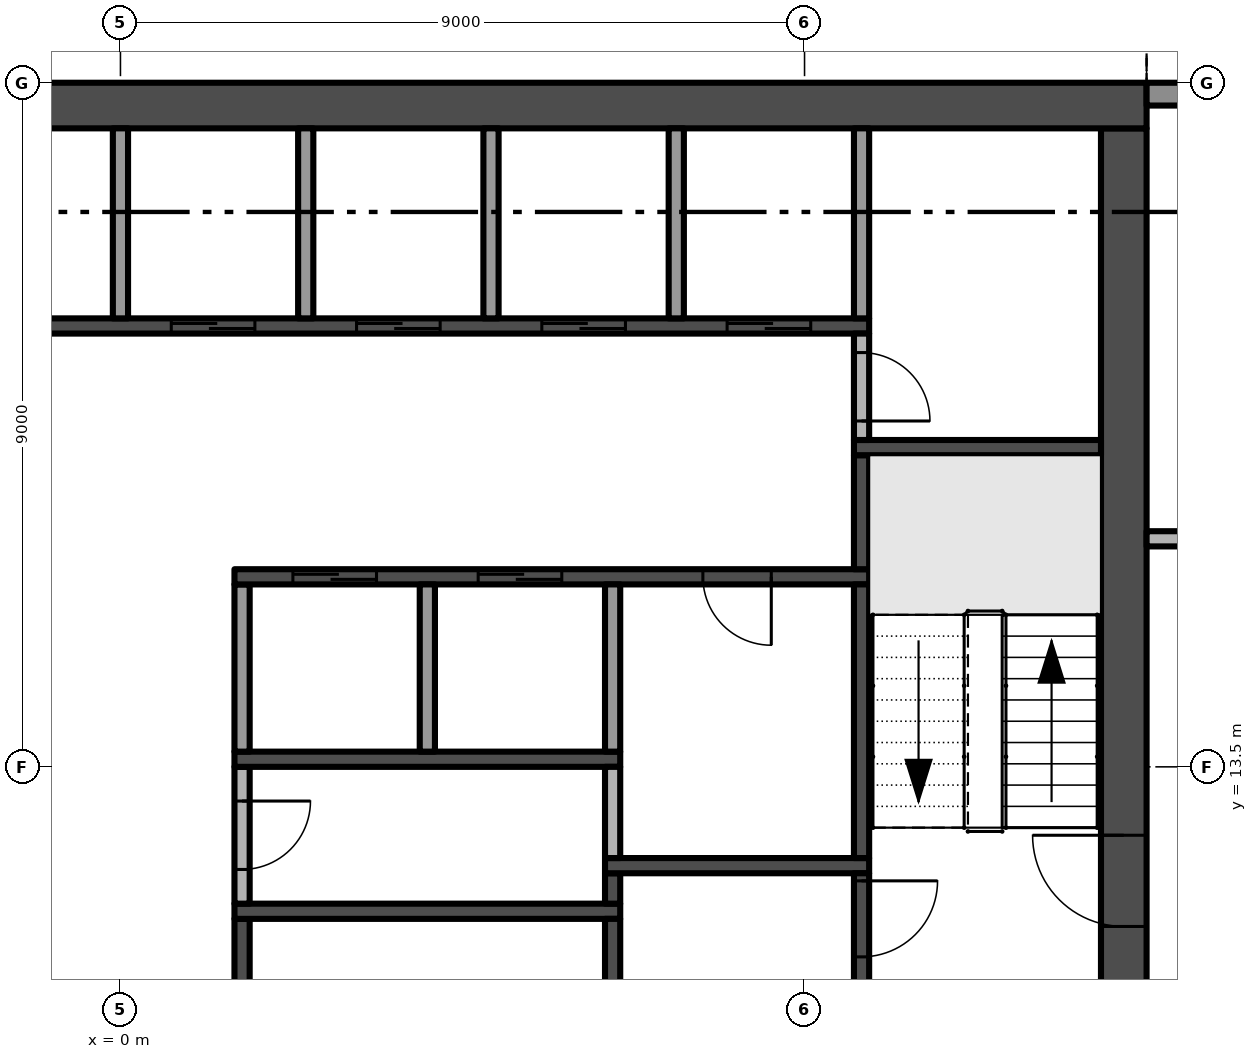
"""IFC4 building model, lengths in metres.
Left out: names, types, materials, properties, quantities, classifications, styles, units other than length and angle.
Written with IfcOpenShell. Run it as: python <this file> out.ifc"""

import sys

from ifc_helpers import new_model, si_unit, direction, frame, frame_2d, origin, place, context, subcontext, project, spatial, polyline, rectangle, outline, extrude, element, fill, save


model = new_model("IFC4")
c1 = context("Model", 3, precision=1e-05, world=origin(), true_north=direction((0.0, 1.0)))
c2 = subcontext(c1, "Body", "Model", "MODEL_VIEW")
j1 = project(units=[si_unit("LENGTHUNIT", "METRE"), si_unit("PLANEANGLEUNIT", "RADIAN")], contexts=[c1])
p1 = place(None, origin())
s1 = spatial("IfcSite", under=j1, at=p1, CompositionType="ELEMENT")
p2 = place(p1, origin())
s2 = spatial("IfcBuilding", under=s1, at=p2, CompositionType="ELEMENT")
p3 = place(p2, frame((0.0, 0.0, 199.6)))
s3 = spatial("IfcBuildingStorey", under=s2, at=p3, CompositionType="ELEMENT", Elevation=199.6)
p4 = place(p3, frame((13.2, 5.1, -0.3), z_axis=(0.0, 0.0, 1.0), x_axis=(0.0, 1.0, 0.0)))
e1 = element("IfcWall", 1, at=p4, inside=s3, PredefinedType="SHEAR", context=c2, shape_type="SweptSolid", body=[
    extrude(rectangle(XDim=16.8, YDim=0.6, at=frame_2d((8.4, 0.0))), origin(), (0.0, 0.0, 1.0), 3.8),
])
p5 = place(p4, frame((6.3, 0.0, 0.3)))
e2 = element("IfcOpeningElement", 2, at=p5, cuts=e1, PredefinedType="OPENING", context=c2, shape_type="SweptSolid", body=[
    extrude(rectangle(XDim=1.2, YDim=2.2, at=frame_2d((0.6, 1.1))), frame((0.0, 0.31, 0.0), z_axis=(0.0, -1.0, 0.0), x_axis=(1.0, 0.0, 0.0)), (0.0, 0.0, 1.0), 0.62),
])
p6 = place(p3, frame((13.5, 22.2, -0.3), z_axis=(0.0, 0.0, 1.0), x_axis=(-1.0, 0.0, 0.0)))
e3 = element("IfcWall", 3, at=p6, inside=s3, PredefinedType="SHEAR", context=c2, shape_type="SweptSolid", body=[
    extrude(rectangle(XDim=27.0, YDim=0.6, at=frame_2d((13.5, 0.0))), origin(), (0.0, 0.0, 1.0), 3.8),
])
p7 = place(p3, frame((13.5, 22.35, 0.0), z_axis=(0.0, 0.0, 1.0), x_axis=(1.0, 0.0, 0.0)))
e4 = element("IfcWall", 4, at=p7, inside=s3, PredefinedType="SOLIDWALL", context=c2, shape_type="SweptSolid", body=[
    extrude(rectangle(XDim=4.0, YDim=0.3, at=frame_2d((2.0, 0.0))), origin(), (0.0, 0.0, 1.0), 3.5),
])
p8 = place(p7, frame((0.625, 0.0, 0.0)))
e5 = element("IfcOpeningElement", 5, at=p8, cuts=e4, PredefinedType="OPENING", context=c2, shape_type="SweptSolid", body=[
    extrude(rectangle(XDim=3.075, YDim=2.4, at=frame_2d((1.538, 1.2))), frame((0.0, 0.16, 0.0), z_axis=(0.0, -1.0, 0.0), x_axis=(1.0, 0.0, 0.0)), (0.0, 0.0, 1.0), 0.32),
])
p9 = place(p3, origin())
e6 = element("IfcWall", 6, at=p9, inside=s3, PredefinedType="USERDEFINED", context=c2, shape_type="SweptSolid", body=[
    extrude(outline(polyline([(22.5, 23.451), (21.0, 23.115), (20.625, 23.1), (19.5, 23.231), (18.0, 23.755), (16.5, 24.488), (15.0, 25.149), (13.5, 25.485), (13.445, 25.241), (14.921, 24.91), (16.395, 24.261), (17.904, 23.524), (19.444, 22.986), (20.615, 22.849), (21.033, 22.866), (22.555, 23.208), (22.5, 23.451)])), origin(), (0.0, 0.0, 1.0), 0.9),
])
p10 = place(p3, frame((-9.85, 19.3, 0.0), z_axis=(0.0, 0.0, 1.0), x_axis=(1.0, 0.0, 0.0)))
e7 = element("IfcWall", 7, at=p10, inside=s3, PredefinedType="SHEAR", context=c2, shape_type="SweptSolid", body=[
    extrude(rectangle(XDim=19.7, YDim=0.2, at=frame_2d((9.85, 0.0))), origin(), (0.0, 0.0, 1.0), 3.5),
])
p11 = place(p10, frame((10.519, 0.0, 0.0)))
e8 = element("IfcOpeningElement", 8, at=p11, cuts=e7, PredefinedType="OPENING", context=c2, shape_type="SweptSolid", body=[
    extrude(rectangle(XDim=1.1, YDim=2.1, at=frame_2d((0.55, 1.05))), frame((0.0, 0.11, 0.0), z_axis=(0.0, -1.0, 0.0), x_axis=(1.0, 0.0, 0.0)), (0.0, 0.0, 1.0), 0.22),
])
p12 = place(p10, frame((12.956, 0.0, 0.0)))
e9 = element("IfcOpeningElement", 9, at=p12, cuts=e7, PredefinedType="OPENING", context=c2, shape_type="SweptSolid", body=[
    extrude(rectangle(XDim=1.1, YDim=2.1, at=frame_2d((0.55, 1.05))), frame((0.0, 0.11, 0.0), z_axis=(0.0, -1.0, 0.0), x_axis=(1.0, 0.0, 0.0)), (0.0, 0.0, 1.0), 0.22),
])
p13 = place(p10, frame((15.394, 0.0, 0.0)))
e10 = element("IfcOpeningElement", 10, at=p13, cuts=e7, PredefinedType="OPENING", context=c2, shape_type="SweptSolid", body=[
    extrude(rectangle(XDim=1.1, YDim=2.1, at=frame_2d((0.55, 1.05))), frame((0.0, 0.11, 0.0), z_axis=(0.0, -1.0, 0.0), x_axis=(1.0, 0.0, 0.0)), (0.0, 0.0, 1.0), 0.22),
])
p14 = place(p10, frame((17.831, 0.0, 0.0)))
e11 = element("IfcOpeningElement", 11, at=p14, cuts=e7, PredefinedType="OPENING", context=c2, shape_type="SweptSolid", body=[
    extrude(rectangle(XDim=1.1, YDim=2.1, at=frame_2d((0.55, 1.05))), frame((0.0, 0.11, 0.0), z_axis=(0.0, -1.0, 0.0), x_axis=(1.0, 0.0, 0.0)), (0.0, 0.0, 1.0), 0.22),
])
p15 = place(p10, frame((2.087, 0.0, 0.0)))
e12 = element("IfcOpeningElement", 12, at=p15, cuts=e7, PredefinedType="OPENING", context=c2, shape_type="SweptSolid", body=[
    extrude(rectangle(XDim=0.9, YDim=2.1, at=frame_2d((0.45, 1.05))), frame((0.0, 0.11, 0.0), z_axis=(0.0, -1.0, 0.0), x_axis=(1.0, 0.0, 0.0)), (0.0, 0.0, 1.0), 0.22),
])
p16 = place(p10, frame((6.963, 0.0, 0.0)))
e13 = element("IfcOpeningElement", 13, at=p16, cuts=e7, PredefinedType="OPENING", context=c2, shape_type="SweptSolid", body=[
    extrude(rectangle(XDim=0.9, YDim=2.1, at=frame_2d((0.45, 1.05))), frame((0.0, 0.11, 0.0), z_axis=(0.0, -1.0, 0.0), x_axis=(1.0, 0.0, 0.0)), (0.0, 0.0, 1.0), 0.22),
])
p17 = place(p3, frame((0.0, 19.4, 0.0), z_axis=(0.0, 0.0, 1.0), x_axis=(0.0, 1.0, 0.0)))
e14 = element("IfcWall", 14, at=p17, inside=s3, PredefinedType="PARTITIONING", context=c2, shape_type="SweptSolid", body=[
    extrude(rectangle(XDim=2.5, YDim=0.2, at=frame_2d((1.25, 0.0))), origin(), (0.0, 0.0, 1.0), 3.5),
])
p18 = place(p3, frame((1.6, 11.5, 0.0), z_axis=(0.0, 0.0, 1.0), x_axis=(0.0, -1.0, 0.0)))
e15 = element("IfcWall", 15, at=p18, inside=s3, PredefinedType="SHEAR", context=c2, shape_type="SweptSolid", body=[
    extrude(rectangle(XDim=6.4, YDim=0.2, at=frame_2d((3.2, 0.0))), origin(), (0.0, 0.0, 1.0), 3.5),
])
p19 = place(p18, frame((2.35, 0.0, 0.0)))
e16 = element("IfcOpeningElement", 16, at=p19, cuts=e15, PredefinedType="OPENING", context=c2, shape_type="SweptSolid", body=[
    extrude(rectangle(XDim=0.9, YDim=2.1, at=frame_2d((0.45, 1.05))), frame((0.0, 0.11, 0.0), z_axis=(0.0, -1.0, 0.0), x_axis=(1.0, 0.0, 0.0)), (0.0, 0.0, 1.0), 0.22),
])
p20 = place(p3, frame((1.5, 11.6, 0.0), z_axis=(0.0, 0.0, 1.0), x_axis=(1.0, 0.0, 0.0)))
e17 = element("IfcWall", 17, at=p20, inside=s3, PredefinedType="SHEAR", context=c2, shape_type="SweptSolid", body=[
    extrude(rectangle(XDim=5.075, YDim=0.2, at=frame_2d((2.538, 0.0))), origin(), (0.0, 0.0, 1.0), 3.5),
])
p21 = place(p3, frame((1.6, 13.5, 0.0), z_axis=(0.0, 0.0, 1.0), x_axis=(0.0, -1.0, 0.0)))
e18 = element("IfcWall", 18, at=p21, inside=s3, PredefinedType="PARTITIONING", context=c2, shape_type="SweptSolid", body=[
    extrude(rectangle(XDim=1.8, YDim=0.2, at=frame_2d((0.9, 0.0))), origin(), (0.0, 0.0, 1.0), 3.5),
])
p22 = place(p21, frame((0.45, 0.0, 0.0)))
e19 = element("IfcOpeningElement", 19, at=p22, cuts=e18, PredefinedType="OPENING", context=c2, shape_type="SweptSolid", body=[
    extrude(rectangle(XDim=0.9, YDim=2.1, at=frame_2d((0.45, 1.05))), frame((0.0, 0.11, 0.0), z_axis=(0.0, -1.0, 0.0), x_axis=(1.0, 0.0, 0.0)), (0.0, 0.0, 1.0), 0.22),
])
p23 = place(p3, frame((1.5, 13.6, 0.0), z_axis=(0.0, 0.0, 1.0), x_axis=(1.0, 0.0, 0.0)))
e20 = element("IfcWall", 20, at=p23, inside=s3, PredefinedType="SHEAR", context=c2, shape_type="SweptSolid", body=[
    extrude(rectangle(XDim=5.075, YDim=0.2, at=frame_2d((2.538, 0.0))), origin(), (0.0, 0.0, 1.0), 3.5),
])
p24 = place(p3, frame((1.6, 13.7, 0.0), z_axis=(0.0, 0.0, 1.0), x_axis=(0.0, 1.0, 0.0)))
e21 = element("IfcWall", 21, at=p24, inside=s3, PredefinedType="PARTITIONING", context=c2, shape_type="SweptSolid", body=[
    extrude(rectangle(XDim=2.2, YDim=0.2, at=frame_2d((1.1, 0.0))), origin(), (0.0, 0.0, 1.0), 3.5),
])
p25 = place(p3, frame((9.85, 16.0, 0.0), z_axis=(0.0, 0.0, 1.0), x_axis=(-1.0, 0.0, 0.0)))
e22 = element("IfcWall", 22, at=p25, inside=s3, PredefinedType="SHEAR", context=c2, shape_type="SweptSolid", body=[
    extrude(rectangle(XDim=8.35, YDim=0.2, at=frame_2d((4.175, 0.0))), origin(), (0.0, 0.0, 1.0), 3.5),
])
p26 = place(p25, frame((6.481, 0.0, 0.0)))
e23 = element("IfcOpeningElement", 23, at=p26, cuts=e22, PredefinedType="OPENING", context=c2, shape_type="SweptSolid", body=[
    extrude(rectangle(XDim=1.1, YDim=2.1, at=frame_2d((0.55, 1.05))), frame((0.0, 0.11, 0.0), z_axis=(0.0, -1.0, 0.0), x_axis=(1.0, 0.0, 0.0)), (0.0, 0.0, 1.0), 0.22),
])
p27 = place(p25, frame((4.044, 0.0, 0.0)))
e24 = element("IfcOpeningElement", 24, at=p27, cuts=e22, PredefinedType="OPENING", context=c2, shape_type="SweptSolid", body=[
    extrude(rectangle(XDim=1.1, YDim=2.1, at=frame_2d((0.55, 1.05))), frame((0.0, 0.11, 0.0), z_axis=(0.0, -1.0, 0.0), x_axis=(1.0, 0.0, 0.0)), (0.0, 0.0, 1.0), 0.22),
])
p28 = place(p25, frame((1.288, 0.0, 0.0)))
e25 = element("IfcOpeningElement", 25, at=p28, cuts=e22, PredefinedType="OPENING", context=c2, shape_type="SweptSolid", body=[
    extrude(rectangle(XDim=0.9, YDim=2.1, at=frame_2d((0.45, 1.05))), frame((0.0, 0.11, 0.0), z_axis=(0.0, -1.0, 0.0), x_axis=(1.0, 0.0, 0.0)), (0.0, 0.0, 1.0), 0.22),
])
p29 = place(p3, frame((2.438, 19.4, 0.0), z_axis=(0.0, 0.0, 1.0), x_axis=(0.0, 1.0, 0.0)))
e26 = element("IfcWall", 26, at=p29, inside=s3, PredefinedType="PARTITIONING", context=c2, shape_type="SweptSolid", body=[
    extrude(rectangle(XDim=2.5, YDim=0.2, at=frame_2d((1.25, 0.0))), origin(), (0.0, 0.0, 1.0), 3.5),
])
p30 = place(p3, frame((4.037, 13.7, 0.0), z_axis=(0.0, 0.0, 1.0), x_axis=(0.0, 1.0, 0.0)))
e27 = element("IfcWall", 27, at=p30, inside=s3, PredefinedType="PARTITIONING", context=c2, shape_type="SweptSolid", body=[
    extrude(rectangle(XDim=2.2, YDim=0.2, at=frame_2d((1.1, 0.0))), origin(), (0.0, 0.0, 1.0), 3.5),
])
p31 = place(p3, frame((4.875, 19.4, 0.0), z_axis=(0.0, 0.0, 1.0), x_axis=(0.0, 1.0, 0.0)))
e28 = element("IfcWall", 28, at=p31, inside=s3, PredefinedType="PARTITIONING", context=c2, shape_type="SweptSolid", body=[
    extrude(rectangle(XDim=2.5, YDim=0.2, at=frame_2d((1.25, 0.0))), origin(), (0.0, 0.0, 1.0), 3.5),
])
p32 = place(p3, frame((6.475, 5.1, 0.0), z_axis=(0.0, 0.0, 1.0), x_axis=(0.0, 1.0, 0.0)))
e29 = element("IfcWall", 29, at=p32, inside=s3, PredefinedType="SHEAR", context=c2, shape_type="SweptSolid", body=[
    extrude(rectangle(XDim=6.4, YDim=0.2, at=frame_2d((3.2, 0.0))), origin(), (0.0, 0.0, 1.0), 3.5),
])
p33 = place(p3, frame((6.475, 11.7, 0.0), z_axis=(0.0, 0.0, 1.0), x_axis=(0.0, 1.0, 0.0)))
e30 = element("IfcWall", 30, at=p33, inside=s3, PredefinedType="SHEAR", context=c2, shape_type="SweptSolid", body=[
    extrude(rectangle(XDim=0.4, YDim=0.2, at=frame_2d((0.2, 0.0))), origin(), (0.0, 0.0, 1.0), 3.5),
])
p34 = place(p3, frame((6.375, 12.2, 0.0), z_axis=(0.0, 0.0, 1.0), x_axis=(1.0, 0.0, 0.0)))
e31 = element("IfcWall", 31, at=p34, inside=s3, PredefinedType="SHEAR", context=c2, shape_type="SweptSolid", body=[
    extrude(rectangle(XDim=3.475, YDim=0.2, at=frame_2d((1.738, 0.0))), origin(), (0.0, 0.0, 1.0), 3.5),
])
p35 = place(p3, frame((6.475, 12.3, 0.0), z_axis=(0.0, 0.0, 1.0), x_axis=(0.0, 1.0, 0.0)))
e32 = element("IfcWall", 32, at=p35, inside=s3, PredefinedType="PARTITIONING", context=c2, shape_type="SweptSolid", body=[
    extrude(rectangle(XDim=1.2, YDim=0.2, at=frame_2d((0.6, 0.0))), origin(), (0.0, 0.0, 1.0), 3.5),
])
p36 = place(p3, frame((6.475, 13.7, 0.0), z_axis=(0.0, 0.0, 1.0), x_axis=(0.0, 1.0, 0.0)))
e33 = element("IfcWall", 33, at=p36, inside=s3, PredefinedType="PARTITIONING", context=c2, shape_type="SweptSolid", body=[
    extrude(rectangle(XDim=2.2, YDim=0.2, at=frame_2d((1.1, 0.0))), origin(), (0.0, 0.0, 1.0), 3.5),
])
p37 = place(p3, frame((7.312, 19.4, 0.0), z_axis=(0.0, 0.0, 1.0), x_axis=(0.0, 1.0, 0.0)))
e34 = element("IfcWall", 34, at=p37, inside=s3, PredefinedType="PARTITIONING", context=c2, shape_type="SweptSolid", body=[
    extrude(rectangle(XDim=2.5, YDim=0.2, at=frame_2d((1.25, 0.0))), origin(), (0.0, 0.0, 1.0), 3.5),
])
p38 = place(p3, frame((9.75, 12.1, 0.0), z_axis=(0.0, 0.0, 1.0), x_axis=(0.0, -1.0, 0.0)))
e35 = element("IfcWall", 35, at=p38, inside=s3, PredefinedType="SHEAR", context=c2, shape_type="SweptSolid", body=[
    extrude(rectangle(XDim=1.9, YDim=0.2, at=frame_2d((0.95, 0.0))), origin(), (0.0, 0.0, 1.0), 3.5),
])
p39 = place(p38, frame((0.1, 0.0, 0.0)))
e36 = element("IfcOpeningElement", 36, at=p39, cuts=e35, PredefinedType="OPENING", context=c2, shape_type="SweptSolid", body=[
    extrude(rectangle(XDim=1.0, YDim=2.2, at=frame_2d((0.5, 1.1))), frame((0.0, 0.11, 0.0), z_axis=(0.0, -1.0, 0.0), x_axis=(1.0, 0.0, 0.0)), (0.0, 0.0, 1.0), 0.22),
])
p40 = place(p3, frame((9.75, 12.3, 0.0), z_axis=(0.0, 0.0, 1.0), x_axis=(0.0, 1.0, 0.0)))
e37 = element("IfcWall", 37, at=p40, inside=s3, PredefinedType="SHEAR", context=c2, shape_type="SweptSolid", body=[
    extrude(rectangle(XDim=3.6, YDim=0.2, at=frame_2d((1.8, 0.0))), origin(), (0.0, 0.0, 1.0), 3.5),
])
p41 = place(p3, frame((9.75, 16.1, 0.0), z_axis=(0.0, 0.0, 1.0), x_axis=(0.0, 1.0, 0.0)))
e38 = element("IfcWall", 38, at=p41, inside=s3, PredefinedType="SHEAR", context=c2, shape_type="SweptSolid", body=[
    extrude(rectangle(XDim=1.5, YDim=0.2, at=frame_2d((0.75, 0.0))), origin(), (0.0, 0.0, 1.0), 3.5),
])
p42 = place(p3, frame((9.65, 17.7, 0.0), z_axis=(0.0, 0.0, 1.0), x_axis=(1.0, 0.0, 0.0)))
e39 = element("IfcWall", 39, at=p42, inside=s3, PredefinedType="SHEAR", context=c2, shape_type="SweptSolid", body=[
    extrude(rectangle(XDim=3.25, YDim=0.2, at=frame_2d((1.625, 0.0))), origin(), (0.0, 0.0, 1.0), 3.5),
])
p43 = place(p3, frame((9.75, 19.2, 0.0), z_axis=(0.0, 0.0, 1.0), x_axis=(0.0, -1.0, 0.0)))
e40 = element("IfcWall", 40, at=p43, inside=s3, PredefinedType="PARTITIONING", context=c2, shape_type="SweptSolid", body=[
    extrude(rectangle(XDim=1.4, YDim=0.2, at=frame_2d((0.7, 0.0))), origin(), (0.0, 0.0, 1.0), 3.5),
])
p44 = place(p43, frame((0.25, 0.0, 0.0)))
e41 = element("IfcOpeningElement", 41, at=p44, cuts=e40, PredefinedType="OPENING", context=c2, shape_type="SweptSolid", body=[
    extrude(rectangle(XDim=0.9, YDim=2.1, at=frame_2d((0.45, 1.05))), frame((0.0, 0.11, 0.0), z_axis=(0.0, -1.0, 0.0), x_axis=(1.0, 0.0, 0.0)), (0.0, 0.0, 1.0), 0.22),
])
p45 = place(p3, frame((9.75, 19.4, 0.0), z_axis=(0.0, 0.0, 1.0), x_axis=(0.0, 1.0, 0.0)))
e42 = element("IfcWall", 42, at=p45, inside=s3, PredefinedType="PARTITIONING", context=c2, shape_type="SweptSolid", body=[
    extrude(rectangle(XDim=2.5, YDim=0.2, at=frame_2d((1.25, 0.0))), origin(), (0.0, 0.0, 1.0), 3.5),
])
p46 = place(p3, frame((13.5, 16.5, 0.0), z_axis=(0.0, 0.0, 1.0), x_axis=(1.0, 0.0, 0.0)))
e43 = element("IfcWall", 43, at=p46, inside=s3, PredefinedType="PARTITIONING", context=c2, shape_type="SweptSolid", body=[
    extrude(rectangle(XDim=3.825, YDim=0.2, at=frame_2d((1.913, 0.0))), origin(), (0.0, 0.0, 1.0), 3.5),
])
p47 = place(p46, frame((1.55, 0.0, 0.0)))
e44 = element("IfcOpeningElement", 44, at=p47, cuts=e43, PredefinedType="OPENING", context=c2, shape_type="SweptSolid", body=[
    extrude(rectangle(XDim=0.9, YDim=2.1, at=frame_2d((0.45, 1.05))), frame((0.0, 0.11, 0.0), z_axis=(0.0, -1.0, 0.0), x_axis=(1.0, 0.0, 0.0)), (0.0, 0.0, 1.0), 0.22),
])
p48 = place(p5, frame((1.2, 0.0, 0.0), z_axis=(0.0, 0.0, 1.0), x_axis=(-1.0, 0.0, 0.0)))
e45 = element("IfcDoor", 45, at=p48, inside=s3, OperationType="SINGLE_SWING_LEFT", PredefinedType="DOOR", context=c2, shape_type="SweptSolid", body=[
    extrude(rectangle(XDim=1.2, YDim=2.2, at=frame_2d((0.6, 1.1))), frame((0.0, 0.025, 0.0), z_axis=(0.0, -1.0, 0.0), x_axis=(1.0, 0.0, 0.0)), (0.0, 0.0, 1.0), 0.05),
])
fill(e2, e45)
p49 = place(p39, origin())
e46 = element("IfcDoor", 46, at=p49, inside=s3, OperationType="SINGLE_SWING_LEFT", PredefinedType="DOOR", context=c2, shape_type="SweptSolid", body=[
    extrude(rectangle(XDim=1.0, YDim=2.2, at=frame_2d((0.5, 1.1))), frame((0.0, 0.025, 0.0), z_axis=(0.0, -1.0, 0.0), x_axis=(1.0, 0.0, 0.0)), (0.0, 0.0, 1.0), 0.05),
])
fill(e36, e46)
p50 = place(p11, origin())
e47 = element("IfcDoor", 47, at=p50, inside=s3, OperationType="SLIDING_TO_RIGHT", PredefinedType="DOOR", context=c2, shape_type="SweptSolid", body=[
    extrude(rectangle(XDim=1.1, YDim=2.1, at=frame_2d((0.55, 1.05))), frame((0.0, 0.025, 0.0), z_axis=(0.0, -1.0, 0.0), x_axis=(1.0, 0.0, 0.0)), (0.0, 0.0, 1.0), 0.05),
])
fill(e8, e47)
p51 = place(p12, origin())
e48 = element("IfcDoor", 48, at=p51, inside=s3, OperationType="SLIDING_TO_RIGHT", PredefinedType="DOOR", context=c2, shape_type="SweptSolid", body=[
    extrude(rectangle(XDim=1.1, YDim=2.1, at=frame_2d((0.55, 1.05))), frame((0.0, 0.025, 0.0), z_axis=(0.0, -1.0, 0.0), x_axis=(1.0, 0.0, 0.0)), (0.0, 0.0, 1.0), 0.05),
])
fill(e9, e48)
p52 = place(p13, origin())
e49 = element("IfcDoor", 49, at=p52, inside=s3, OperationType="SLIDING_TO_RIGHT", PredefinedType="DOOR", context=c2, shape_type="SweptSolid", body=[
    extrude(rectangle(XDim=1.1, YDim=2.1, at=frame_2d((0.55, 1.05))), frame((0.0, 0.025, 0.0), z_axis=(0.0, -1.0, 0.0), x_axis=(1.0, 0.0, 0.0)), (0.0, 0.0, 1.0), 0.05),
])
fill(e10, e49)
p53 = place(p14, origin())
e50 = element("IfcDoor", 50, at=p53, inside=s3, OperationType="SLIDING_TO_RIGHT", PredefinedType="DOOR", context=c2, shape_type="SweptSolid", body=[
    extrude(rectangle(XDim=1.1, YDim=2.1, at=frame_2d((0.55, 1.05))), frame((0.0, 0.025, 0.0), z_axis=(0.0, -1.0, 0.0), x_axis=(1.0, 0.0, 0.0)), (0.0, 0.0, 1.0), 0.05),
])
fill(e11, e50)
p54 = place(p26, origin())
e51 = element("IfcDoor", 51, at=p54, inside=s3, OperationType="SLIDING_TO_RIGHT", PredefinedType="DOOR", context=c2, shape_type="SweptSolid", body=[
    extrude(rectangle(XDim=1.1, YDim=2.1, at=frame_2d((0.55, 1.05))), frame((0.0, 0.025, 0.0), z_axis=(0.0, -1.0, 0.0), x_axis=(1.0, 0.0, 0.0)), (0.0, 0.0, 1.0), 0.05),
])
fill(e23, e51)
p55 = place(p27, origin())
e52 = element("IfcDoor", 52, at=p55, inside=s3, OperationType="SLIDING_TO_RIGHT", PredefinedType="DOOR", context=c2, shape_type="SweptSolid", body=[
    extrude(rectangle(XDim=1.1, YDim=2.1, at=frame_2d((0.55, 1.05))), frame((0.0, 0.025, 0.0), z_axis=(0.0, -1.0, 0.0), x_axis=(1.0, 0.0, 0.0)), (0.0, 0.0, 1.0), 0.05),
])
fill(e24, e52)
p56 = place(p22, origin())
e53 = element("IfcDoor", 53, at=p56, inside=s3, OperationType="SINGLE_SWING_LEFT", PredefinedType="DOOR", context=c2, shape_type="SweptSolid", body=[
    extrude(rectangle(XDim=0.9, YDim=2.1, at=frame_2d((0.45, 1.05))), frame((0.0, 0.025, 0.0), z_axis=(0.0, -1.0, 0.0), x_axis=(1.0, 0.0, 0.0)), (0.0, 0.0, 1.0), 0.05),
])
fill(e19, e53)
p57 = place(p28, origin())
e54 = element("IfcDoor", 54, at=p57, inside=s3, OperationType="SINGLE_SWING_LEFT", PredefinedType="DOOR", context=c2, shape_type="SweptSolid", body=[
    extrude(rectangle(XDim=0.9, YDim=2.1, at=frame_2d((0.45, 1.05))), frame((0.0, 0.025, 0.0), z_axis=(0.0, -1.0, 0.0), x_axis=(1.0, 0.0, 0.0)), (0.0, 0.0, 1.0), 0.05),
])
fill(e25, e54)
p58 = place(p44, origin())
e55 = element("IfcDoor", 55, at=p58, inside=s3, OperationType="SINGLE_SWING_RIGHT", PredefinedType="DOOR", context=c2, shape_type="SweptSolid", body=[
    extrude(rectangle(XDim=0.9, YDim=2.1, at=frame_2d((0.45, 1.05))), frame((0.0, 0.025, 0.0), z_axis=(0.0, -1.0, 0.0), x_axis=(1.0, 0.0, 0.0)), (0.0, 0.0, 1.0), 0.05),
])
fill(e41, e55)
save(model, sys.argv[1])
